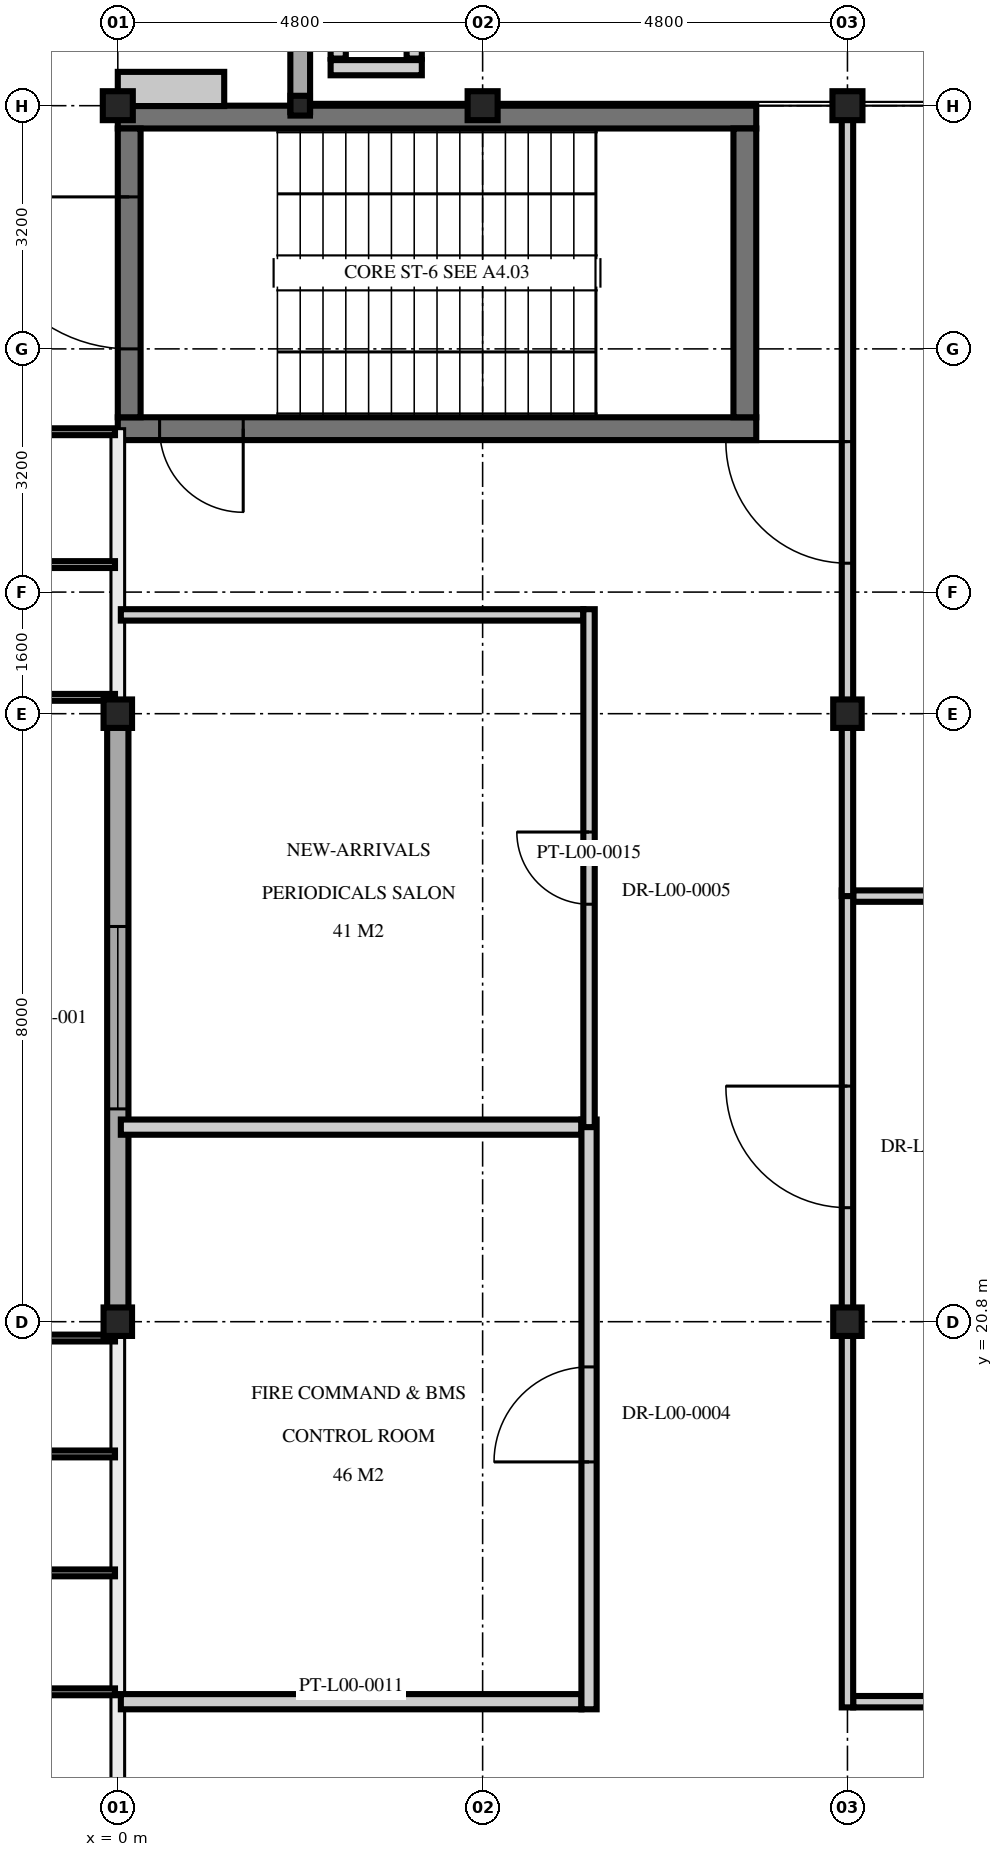
"""IFC4 building model, lengths in metres.
Left out: names, types, materials, properties, quantities, classifications, styles, units other than length and angle.
Written with IfcOpenShell. Run it as: python <this file> out.ifc"""

import sys

from ifc_helpers import new_model, si_unit, direction, frame, frame_2d, origin, origin_2d, place, context, subcontext, project, spatial, rectangle, i_section, extrude, element, fill, save


model = new_model("IFC4")
c1 = context("Model", 3, precision=1e-05, world=origin(), true_north=direction((0.0, 1.0)))
c2 = subcontext(c1, "Body", "Model", "MODEL_VIEW")
j1 = project(units=[si_unit("LENGTHUNIT", "METRE"), si_unit("PLANEANGLEUNIT", "RADIAN")], contexts=[c1])
p1 = place(None, origin())
s1 = spatial("IfcSite", under=j1, at=p1, CompositionType="ELEMENT")
p2 = place(p1, origin())
s2 = spatial("IfcBuilding", under=s1, at=p2, CompositionType="ELEMENT")
p3 = place(p2, origin())
s3 = spatial("IfcBuildingStorey", under=s2, at=p3, CompositionType="ELEMENT", Elevation=0.0)
for number, where, z_axis, x_axis in (
    (1, (0.0, 36.8, 0.0), (0.0, 0.0, 1.0), (1.0, 0.0, 0.0)),
    (2, (4.8, 36.8, 0.0), (0.0, 0.0, 1.0), (1.0, 0.0, 0.0)),
    (3, (9.6, 36.8, 0.0), (0.0, 0.0, 1.0), (1.0, 0.0, 0.0)),
):
    element("IfcColumn", number, at=place(p3, frame(where, z_axis=z_axis, x_axis=x_axis)), inside=s3, PredefinedType="COLUMN", context=c2, shape_type="SweptSolid", body=[
        extrude(i_section(OverallWidth=0.395, OverallDepth=0.381, WebThickness=0.018, FlangeThickness=0.03, at=origin_2d()), origin(), (0.0, 0.0, 1.0), 5.1),
    ])
for number, where, z_axis, x_axis in (
    (4, (0.0, 20.8, 0.0), (0.0, 0.0, 1.0), (1.0, 0.0, 0.0)),
    (5, (0.0, 28.8, 0.0), (0.0, 0.0, 1.0), (1.0, 0.0, 0.0)),
    (6, (9.6, 20.8, 0.0), (0.0, 0.0, 1.0), (1.0, 0.0, 0.0)),
    (7, (9.6, 28.8, 0.0), (0.0, 0.0, 1.0), (1.0, 0.0, 0.0)),
):
    element("IfcColumn", number, at=place(p3, frame(where, z_axis=z_axis, x_axis=x_axis)), inside=s3, PredefinedType="COLUMN", context=c2, shape_type="SweptSolid", body=[
        extrude(i_section(OverallWidth=0.375, OverallDepth=0.375, WebThickness=0.017, FlangeThickness=0.027, at=origin_2d()), origin(), (0.0, 0.0, 1.0), 5.1),
    ])
p4 = place(p3, frame((2.4, 36.8, 0.0), z_axis=(0.0, 0.0, 1.0), x_axis=(1.0, 0.0, 0.0)))
e8 = element("IfcColumn", 8, at=p4, inside=s3, PredefinedType="COLUMN", context=c2, shape_type="SweptSolid", body=[
    extrude(i_section(OverallWidth=0.256, OverallDepth=0.26, WebThickness=0.01, FlangeThickness=0.017, at=origin_2d()), origin(), (0.0, 0.0, 1.0), 5.1),
])
p5 = place(p3, frame((8.4, 32.55, 0.0), z_axis=(0.0, 0.0, 1.0), x_axis=(-1.0, 0.0, 0.0)))
e9 = element("IfcWall", 9, at=p5, inside=s3, PredefinedType="SHEAR", context=c2, shape_type="SweptSolid", body=[
    extrude(rectangle(XDim=8.4, YDim=0.3, at=frame_2d((4.2, 0.0))), origin(), (0.0, 0.0, 1.0), 4.88),
])
p6 = place(p5, frame((6.75, 0.0, 0.0)))
e10 = element("IfcOpeningElement", 10, at=p6, cuts=e9, PredefinedType="OPENING", context=c2, shape_type="SweptSolid", body=[
    extrude(rectangle(XDim=1.1, YDim=2.2, at=frame_2d((0.55, 1.1))), frame((0.0, 0.16, 0.0), z_axis=(0.0, -1.0, 0.0), x_axis=(1.0, 0.0, 0.0)), (0.0, 0.0, 1.0), 0.32),
])
p7 = place(p3, frame((0.0, 36.65, 0.0), z_axis=(0.0, 0.0, 1.0), x_axis=(1.0, 0.0, 0.0)))
e11 = element("IfcWall", 11, at=p7, inside=s3, PredefinedType="SHEAR", context=c2, shape_type="SweptSolid", body=[
    extrude(rectangle(XDim=8.4, YDim=0.3, at=frame_2d((4.2, 0.0))), origin(), (0.0, 0.0, 1.0), 4.88),
])
p8 = place(p3, frame((0.15, 32.7, 0.0), z_axis=(0.0, 0.0, 1.0), x_axis=(0.0, 1.0, 0.0)))
e12 = element("IfcWall", 12, at=p8, inside=s3, PredefinedType="SHEAR", context=c2, shape_type="SweptSolid", body=[
    extrude(rectangle(XDim=3.8, YDim=0.3, at=frame_2d((1.9, 0.0))), origin(), (0.0, 0.0, 1.0), 4.88),
])
p9 = place(p8, frame((0.9, 0.0, 0.0)))
e13 = element("IfcOpeningElement", 13, at=p9, cuts=e12, PredefinedType="OPENING", context=c2, shape_type="SweptSolid", body=[
    extrude(rectangle(XDim=2.0, YDim=2.4, at=frame_2d((1.0, 1.2))), frame((0.0, 0.16, 0.0), z_axis=(0.0, -1.0, 0.0), x_axis=(1.0, 0.0, 0.0)), (0.0, 0.0, 1.0), 0.32),
])
p10 = place(p3, frame((8.25, 36.5, 0.0), z_axis=(0.0, 0.0, 1.0), x_axis=(0.0, -1.0, 0.0)))
e14 = element("IfcWall", 14, at=p10, inside=s3, PredefinedType="SHEAR", context=c2, shape_type="SweptSolid", body=[
    extrude(rectangle(XDim=3.8, YDim=0.3, at=frame_2d((1.9, 0.0))), origin(), (0.0, 0.0, 1.0), 4.88),
])
p11 = place(p3, frame((4.0, 37.3, 0.0), z_axis=(0.0, 0.0, 1.0), x_axis=(-1.0, 0.0, 0.0)))
e15 = element("IfcWall", 15, at=p11, inside=s3, PredefinedType="PARTITIONING", context=c2, shape_type="SweptSolid", body=[
    extrude(rectangle(XDim=1.2, YDim=0.2, at=frame_2d((0.6, 0.0))), origin(), (0.0, 0.0, 1.0), 4.38),
])
for number, where, z_axis, x_axis in (
    (16, (2.9, 37.42, 0.0), (0.0, 0.0, 1.0), (0.0, 1.0, 0.0)),
    (17, (3.9, 38.18, 0.0), (0.0, 0.0, 1.0), (0.0, -1.0, 0.0)),
):
    element("IfcWall", number, at=place(p3, frame(where, z_axis=z_axis, x_axis=x_axis)), inside=s3, PredefinedType="PARTITIONING", context=c2, shape_type="SweptSolid", body=[
        extrude(rectangle(XDim=0.76, YDim=0.2, at=frame_2d((0.38, 0.0))), origin(), (0.0, 0.0, 1.0), 4.38),
    ])
p12 = place(p3, frame((0.0, 20.715, 0.0), z_axis=(0.0, 0.0, 1.0), x_axis=(0.0, 1.0, 0.0)))
e18 = element("IfcWall", 18, at=p12, inside=s3, PredefinedType="SOLIDWALL", context=c2, shape_type="SweptSolid", body=[
    extrude(rectangle(XDim=8.17, YDim=0.28, at=frame_2d((4.085, 0.0))), origin(), (0.0, 0.0, 1.0), 4.305),
])
p13 = place(p12, frame((2.885, 0.0, 0.95)))
e19 = element("IfcOpeningElement", 19, at=p13, cuts=e18, PredefinedType="OPENING", context=c2, shape_type="SweptSolid", body=[
    extrude(rectangle(XDim=2.4, YDim=2.1, at=frame_2d((1.2, 1.05))), frame((0.0, 0.15, 0.0), z_axis=(0.0, -1.0, 0.0), x_axis=(1.0, 0.0, 0.0)), (0.0, 0.0, 1.0), 0.3),
])
p14 = place(p3, frame((2.4, 36.715, 0.0), z_axis=(0.0, 0.0, 1.0), x_axis=(0.0, 1.0, 0.0)))
e20 = element("IfcWall", 20, at=p14, inside=s3, PredefinedType="SOLIDWALL", context=c2, shape_type="SweptSolid", body=[
    extrude(rectangle(XDim=4.97, YDim=0.26, at=frame_2d((2.485, 0.0))), origin(), (0.0, 0.0, 1.0), 4.305),
])
p15 = place(p14, frame((1.585, 0.0, 0.0)))
e21 = element("IfcOpeningElement", 21, at=p15, cuts=e20, PredefinedType="OPENING", context=c2, shape_type="SweptSolid", body=[
    extrude(rectangle(XDim=1.8, YDim=2.4, at=frame_2d((0.9, 1.2))), frame((0.0, 0.14, 0.0), z_axis=(0.0, -1.0, 0.0), x_axis=(1.0, 0.0, 0.0)), (0.0, 0.0, 1.0), 0.28),
])
for number, where, z_axis, x_axis in (
    (22, (0.04, 15.8, 0.0), (0.0, 0.0, 1.0), (1.0, 0.0, 0.0)),
    (23, (0.04, 23.36, 0.0), (0.0, 0.0, 1.0), (1.0, 0.0, 0.0)),
):
    element("IfcWall", number, at=place(p3, frame(where, z_axis=z_axis, x_axis=x_axis)), inside=s3, PredefinedType="PARTITIONING", context=c2, shape_type="SweptSolid", body=[
        extrude(rectangle(XDim=6.06, YDim=0.2, at=frame_2d((3.03, 0.0))), origin(), (0.0, 0.0, 1.0), 4.405),
    ])
p16 = place(p3, frame((6.2, 15.7, 0.0), z_axis=(0.0, 0.0, 1.0), x_axis=(0.0, 1.0, 0.0)))
e24 = element("IfcWall", 24, at=p16, inside=s3, PredefinedType="PARTITIONING", context=c2, shape_type="SweptSolid", body=[
    extrude(rectangle(XDim=7.76, YDim=0.2, at=frame_2d((3.88, 0.0))), origin(), (0.0, 0.0, 1.0), 4.305),
])
p17 = place(p16, frame((3.255, 0.0, 0.0)))
e25 = element("IfcOpeningElement", 25, at=p17, cuts=e24, PredefinedType="OPENING", context=c2, shape_type="SweptSolid", body=[
    extrude(rectangle(XDim=1.25, YDim=2.25, at=frame_2d((0.625, 1.125))), frame((0.0, 0.11, 0.0), z_axis=(0.0, -1.0, 0.0), x_axis=(1.0, 0.0, 0.0)), (0.0, 0.0, 1.0), 0.22),
])
p18 = place(p3, frame((0.04, 30.1, 0.0), z_axis=(0.0, 0.0, 1.0), x_axis=(1.0, 0.0, 0.0)))
e26 = element("IfcWall", 26, at=p18, inside=s3, PredefinedType="PARTITIONING", context=c2, shape_type="SweptSolid", body=[
    extrude(rectangle(XDim=6.085, YDim=0.15, at=frame_2d((3.042, 0.0))), origin(), (0.0, 0.0, 1.0), 4.405),
])
p19 = place(p3, frame((6.2, 23.36, 0.0), z_axis=(0.0, 0.0, 1.0), x_axis=(0.0, 1.0, 0.0)))
e27 = element("IfcWall", 27, at=p19, inside=s3, PredefinedType="PARTITIONING", context=c2, shape_type="SweptSolid", body=[
    extrude(rectangle(XDim=6.815, YDim=0.15, at=frame_2d((3.407, 0.0))), origin(), (0.0, 0.0, 1.0), 4.305),
])
p20 = place(p19, frame((2.933, 0.0, 0.0)))
e28 = element("IfcOpeningElement", 28, at=p20, cuts=e27, PredefinedType="OPENING", context=c2, shape_type="SweptSolid", body=[
    extrude(rectangle(XDim=0.95, YDim=2.15, at=frame_2d((0.475, 1.075))), frame((0.0, 0.085, 0.0), z_axis=(0.0, -1.0, 0.0), x_axis=(1.0, 0.0, 0.0)), (0.0, 0.0, 1.0), 0.17),
])
for number, where, z_axis, x_axis in (
    (29, (9.675, 15.8, 0.0), (0.0, 0.0, 1.0), (1.0, 0.0, 0.0)),
    (30, (9.675, 26.4, 0.0), (0.0, 0.0, 1.0), (1.0, 0.0, 0.0)),
):
    element("IfcWall", number, at=place(p3, frame(where, z_axis=z_axis, x_axis=x_axis)), inside=s3, PredefinedType="PARTITIONING", context=c2, shape_type="SweptSolid", body=[
        extrude(rectangle(XDim=16.45, YDim=0.15, at=frame_2d((8.225, 0.0))), origin(), (0.0, 0.0, 1.0), 4.405),
    ])
p21 = place(p3, frame((9.6, 15.725, 0.0), z_axis=(0.0, 0.0, 1.0), x_axis=(0.0, 1.0, 0.0)))
e31 = element("IfcWall", 31, at=p21, inside=s3, PredefinedType="PARTITIONING", context=c2, shape_type="SweptSolid", body=[
    extrude(rectangle(XDim=10.75, YDim=0.15, at=frame_2d((5.375, 0.0))), origin(), (0.0, 0.0, 1.0), 4.305),
])
p22 = place(p21, frame((6.575, 0.0, 0.0)))
e32 = element("IfcOpeningElement", 32, at=p22, cuts=e31, PredefinedType="OPENING", context=c2, shape_type="SweptSolid", body=[
    extrude(rectangle(XDim=1.6, YDim=2.25, at=frame_2d((0.8, 1.125))), frame((0.0, 0.085, 0.0), z_axis=(0.0, -1.0, 0.0), x_axis=(1.0, 0.0, 0.0)), (0.0, 0.0, 1.0), 0.17),
])
p23 = place(p3, frame((9.6, 26.4, 0.0), z_axis=(0.0, 0.0, 1.0), x_axis=(0.0, 1.0, 0.0)))
e33 = element("IfcWall", 33, at=p23, inside=s3, PredefinedType="PARTITIONING", context=c2, shape_type="SweptSolid", body=[
    extrude(rectangle(XDim=10.36, YDim=0.15, at=frame_2d((5.18, 0.0))), origin(), (0.0, 0.0, 1.0), 4.305),
])
p24 = place(p23, frame((4.38, 0.0, 0.0)))
e34 = element("IfcOpeningElement", 34, at=p24, cuts=e33, PredefinedType="OPENING", context=c2, shape_type="SweptSolid", body=[
    extrude(rectangle(XDim=1.6, YDim=2.25, at=frame_2d((0.8, 1.125))), frame((0.0, 0.085, 0.0), z_axis=(0.0, -1.0, 0.0), x_axis=(1.0, 0.0, 0.0)), (0.0, 0.0, 1.0), 0.17),
])
p25 = place(p6, origin())
e35 = element("IfcDoor", 35, at=p25, inside=s3, OperationType="SINGLE_SWING_LEFT", PredefinedType="DOOR", context=c2, shape_type="SweptSolid", body=[
    extrude(rectangle(XDim=1.1, YDim=2.2, at=frame_2d((0.55, 1.1))), frame((0.0, 0.025, 0.0), z_axis=(0.0, -1.0, 0.0), x_axis=(1.0, 0.0, 0.0)), (0.0, 0.0, 1.0), 0.05),
])
fill(e10, e35)
p26 = place(p9, origin())
e36 = element("IfcDoor", 36, at=p26, inside=s3, OperationType="SINGLE_SWING_RIGHT", PredefinedType="DOOR", context=c2, shape_type="SweptSolid", body=[
    extrude(rectangle(XDim=2.0, YDim=2.4, at=frame_2d((1.0, 1.2))), frame((0.0, 0.025, 0.0), z_axis=(0.0, -1.0, 0.0), x_axis=(1.0, 0.0, 0.0)), (0.0, 0.0, 1.0), 0.05),
])
fill(e13, e36)
p27 = place(p13, origin())
e37 = element("IfcWindow", 37, at=p27, inside=s3, PartitioningType="SINGLE_PANEL", PredefinedType="WINDOW", context=c2, shape_type="SweptSolid", body=[
    extrude(rectangle(XDim=2.4, YDim=2.1, at=frame_2d((1.2, 1.05))), frame((0.0, 0.03, 0.0), z_axis=(0.0, -1.0, 0.0), x_axis=(1.0, 0.0, 0.0)), (0.0, 0.0, 1.0), 0.06),
])
fill(e19, e37)
p28 = place(p17, origin())
e38 = element("IfcDoor", 38, at=p28, inside=s3, OperationType="SINGLE_SWING_LEFT", PredefinedType="DOOR", context=c2, shape_type="SweptSolid", body=[
    extrude(rectangle(XDim=1.25, YDim=2.25, at=frame_2d((0.625, 1.125))), frame((0.0, 0.025, 0.0), z_axis=(0.0, -1.0, 0.0), x_axis=(1.0, 0.0, 0.0)), (0.0, 0.0, 1.0), 0.05),
])
fill(e25, e38)
p29 = place(p20, origin())
e39 = element("IfcDoor", 39, at=p29, inside=s3, OperationType="SINGLE_SWING_RIGHT", PredefinedType="DOOR", context=c2, shape_type="SweptSolid", body=[
    extrude(rectangle(XDim=0.95, YDim=2.15, at=frame_2d((0.475, 1.075))), frame((0.0, 0.025, 0.0), z_axis=(0.0, -1.0, 0.0), x_axis=(1.0, 0.0, 0.0)), (0.0, 0.0, 1.0), 0.05),
])
fill(e28, e39)
p30 = place(p22, origin())
e40 = element("IfcDoor", 40, at=p30, inside=s3, OperationType="DOUBLE_DOOR_SINGLE_SWING", PredefinedType="DOOR", context=c2, shape_type="SweptSolid", body=[
    extrude(rectangle(XDim=1.6, YDim=2.25, at=frame_2d((0.8, 1.125))), frame((0.0, 0.025, 0.0), z_axis=(0.0, -1.0, 0.0), x_axis=(1.0, 0.0, 0.0)), (0.0, 0.0, 1.0), 0.05),
])
fill(e32, e40)
p31 = place(p24, origin())
e41 = element("IfcDoor", 41, at=p31, inside=s3, OperationType="DOUBLE_DOOR_SINGLE_SWING", PredefinedType="DOOR", context=c2, shape_type="SweptSolid", body=[
    extrude(rectangle(XDim=1.6, YDim=2.25, at=frame_2d((0.8, 1.125))), frame((0.0, 0.025, 0.0), z_axis=(0.0, -1.0, 0.0), x_axis=(1.0, 0.0, 0.0)), (0.0, 0.0, 1.0), 0.05),
])
fill(e34, e41)
save(model, sys.argv[1])
